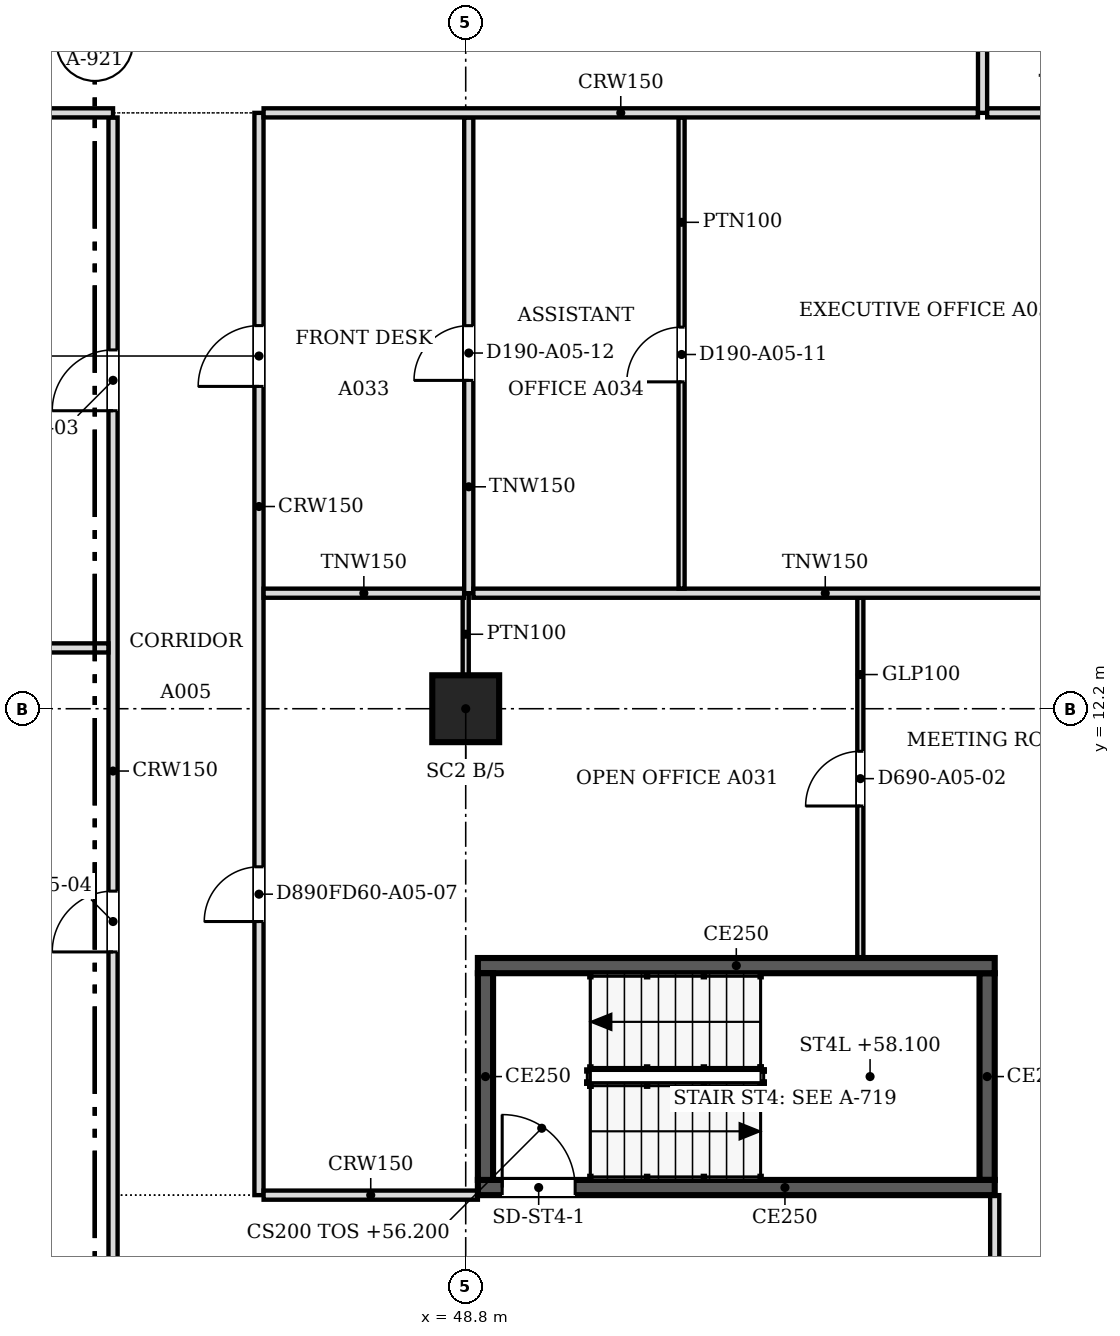
"""IFC4 building model, lengths in metres.
Left out: names, types, materials, properties, quantities, classifications, styles, units other than length and angle.
Written with IfcOpenShell. Run it as: python <this file> out.ifc"""

import sys

from ifc_helpers import new_model, si_unit, direction, frame, frame_2d, origin, origin_2d, place, context, subcontext, project, spatial, polyline, rectangle, outline, extrude, faceted_brep, source, transform, mapped, element, fill, save


model = new_model("IFC4")
c1 = context("Model", 3, precision=1e-05, world=origin(), true_north=direction((0.0, 1.0)))
c2 = subcontext(c1, "Body", "Model", "MODEL_VIEW")
j1 = project(units=[si_unit("LENGTHUNIT", "METRE"), si_unit("PLANEANGLEUNIT", "RADIAN")], contexts=[c1])
p1 = place(None, origin())
s1 = spatial("IfcSite", under=j1, at=p1, CompositionType="ELEMENT")
p2 = place(p1, origin())
s2 = spatial("IfcBuilding", under=s1, at=p2, CompositionType="ELEMENT")
p3 = place(p2, frame((0.0, 0.0, 56.2)))
s3 = spatial("IfcBuildingStorey", under=s2, at=p3, CompositionType="ELEMENT", Elevation=56.2)
p4 = place(p3, frame((48.8, 12.2, 0.0), z_axis=(0.0, 0.0, 1.0), x_axis=(1.0, 0.0, 0.0)))
e1 = element("IfcColumn", 1, at=p4, inside=s3, PredefinedType="COLUMN", context=c2, shape_type="SweptSolid", body=[
    extrude(rectangle(XDim=1.1, YDim=1.1, at=origin_2d()), origin(), (0.0, 0.0, 1.0), 3.6),
])
m1 = source(origin(), c2, "Body", "Brep", [
    faceted_brep([(2.944, -0.25, 0.0), (2.997, -0.25, 0.068), (2.997, -0.25, 7.532), (2.944, -0.25, 7.6), (0.0, -0.25, 3.8), (0.053, 0.25, 3.868), (2.891, 0.25, 7.532), (2.891, 0.25, 0.068), (0.053, 0.25, 3.732), (2.944, 0.0, 0.0), (2.944, 0.0, 7.6), (0.0, 0.0, 3.8)], [[[0, 1, 2, 3, 4]], [[5, 6, 7, 8]], [[1, 0, 9]], [[10, 3, 2]], [[6, 5, 11, 4, 3, 10]], [[8, 7, 9, 0, 4, 11]], [[8, 11, 5]], [[1, 9, 7, 6, 10, 2]]]),
])
p5 = place(p3, frame((57.606, 1.312, -3.8), z_axis=(0.0, 0.0, 1.0), x_axis=(0.707147509625, 0.707066050402, 0.0)))
e2 = element("IfcWall", 2, at=p5, inside=s3, PredefinedType="SOLIDWALL", context=c2, shape_type="MappedRepresentation", body=[
    mapped(m1, transform((0.0, 0.0, 0.0), scale=1.0)),
])
m2 = source(origin(), c2, "Body", "SweptSolid", [
    extrude(outline(polyline([(2.744, 6.934), (0.316, 3.8), (2.744, 0.667), (2.744, 6.934)])), frame((0.0, 0.26, 0.0), z_axis=(0.0, -1.0, 0.0), x_axis=(1.0, 0.0, 0.0)), (0.0, 0.0, 1.0), 0.52),
])
p6 = place(p5, origin())
e3 = element("IfcOpeningElement", 3, at=p6, cuts=e2, PredefinedType="OPENING", context=c2, shape_type="MappedRepresentation", body=[
    mapped(m2, transform((0.0, 0.0, 0.0), scale=1.0)),
])
p7 = place(p2, frame((0.0, 0.0, 60.0)))
s4 = spatial("IfcBuildingStorey", under=s2, at=p7, CompositionType="ELEMENT", Elevation=60.0)
m3 = source(origin(), c2, "Body", "Brep", [
    faceted_brep([(0.053, -0.25, 0.0), (2.997, -0.25, 3.8), (0.053, -0.25, 7.6), (0.0, -0.25, 7.532), (0.0, -0.25, 0.068), (0.106, 0.25, 7.532), (2.944, 0.25, 3.868), (2.944, 0.25, 3.732), (0.106, 0.25, 0.068), (2.997, 0.0, 3.8), (0.053, 0.0, 0.0), (0.053, 0.0, 7.6)], [[[0, 1, 2, 3, 4]], [[5, 6, 7, 8]], [[8, 7, 9, 1, 0, 10]], [[6, 5, 11, 2, 1, 9]], [[3, 2, 11]], [[10, 0, 4]], [[8, 10, 4, 3, 11, 5]], [[9, 7, 6]]]),
])
p8 = place(p7, frame((57.569, 1.274, -3.8), z_axis=(0.0, 0.0, 1.0), x_axis=(0.707066050402, 0.707147509625, 0.0)))
e4 = element("IfcWall", 4, at=p8, inside=s4, PredefinedType="SOLIDWALL", context=c2, shape_type="MappedRepresentation", body=[
    mapped(m3, transform((0.0, 0.0, 0.0), scale=1.0)),
])
m4 = source(origin(), c2, "Body", "SweptSolid", [
    extrude(outline(polyline([(0.253, 0.666), (2.681, 3.8), (0.253, 6.934), (0.253, 0.666)])), frame((0.0, 0.26, 0.0), z_axis=(0.0, -1.0, 0.0), x_axis=(1.0, 0.0, 0.0)), (0.0, 0.0, 1.0), 0.52),
])
p9 = place(p8, origin())
e5 = element("IfcOpeningElement", 5, at=p9, cuts=e4, PredefinedType="OPENING", context=c2, shape_type="MappedRepresentation", body=[
    mapped(m4, transform((0.0, 0.0, 0.0), scale=1.0)),
])
p10 = place(p3, frame((57.5, 4.325, 0.0), z_axis=(0.0, 0.0, 1.0), x_axis=(-1.0, 0.0, 0.0)))
e6 = element("IfcWall", 6, at=p10, inside=s3, PredefinedType="SOLIDWALL", context=c2, shape_type="SweptSolid", body=[
    extrude(rectangle(XDim=8.5, YDim=0.25, at=frame_2d((4.25, 0.0))), origin(), (0.0, 0.0, 1.0), 3.8),
])
m5 = source(origin(), c2, "Body", "SweptSolid", [
    extrude(rectangle(XDim=1.2, YDim=2.1, at=frame_2d((0.6, 1.05))), frame((0.0, 0.135, 0.0), z_axis=(0.0, -1.0, 0.0), x_axis=(1.0, 0.0, 0.0)), (0.0, 0.0, 1.0), 0.27),
])
p11 = place(p10, frame((6.9, 0.0, 0.0)))
e7 = element("IfcOpeningElement", 7, at=p11, cuts=e6, PredefinedType="OPENING", context=c2, shape_type="MappedRepresentation", body=[
    mapped(m5, transform((0.0, 0.0, 0.0), scale=1.0)),
])
p12 = place(p3, frame((49.125, 4.45, 0.0), z_axis=(0.0, 0.0, 1.0), x_axis=(0.0, 1.0, 0.0)))
e8 = element("IfcWall", 8, at=p12, inside=s3, PredefinedType="SOLIDWALL", context=c2, shape_type="SweptSolid", body=[
    extrude(rectangle(XDim=3.4, YDim=0.25, at=frame_2d((1.7, 0.0))), origin(), (0.0, 0.0, 1.0), 3.8),
])
p13 = place(p3, frame((49.0, 7.975, 0.0), z_axis=(0.0, 0.0, 1.0), x_axis=(1.0, 0.0, 0.0)))
e9 = element("IfcWall", 9, at=p13, inside=s3, PredefinedType="SOLIDWALL", context=c2, shape_type="SweptSolid", body=[
    extrude(rectangle(XDim=8.5, YDim=0.25, at=frame_2d((4.25, 0.0))), origin(), (0.0, 0.0, 1.0), 3.8),
])
p14 = place(p3, frame((57.375, 7.85, 0.0), z_axis=(0.0, 0.0, 1.0), x_axis=(0.0, -1.0, 0.0)))
e10 = element("IfcWall", 10, at=p14, inside=s3, PredefinedType="SOLIDWALL", context=c2, shape_type="SweptSolid", body=[
    extrude(rectangle(XDim=3.4, YDim=0.25, at=frame_2d((1.7, 0.0))), origin(), (0.0, 0.0, 1.0), 3.8),
])
p15 = place(p3, frame((43.0, 0.5, 0.0), z_axis=(0.0, 0.0, 1.0), x_axis=(0.0, 1.0, 0.0)))
e11 = element("IfcWall", 11, at=p15, inside=s3, PredefinedType="PARTITIONING", context=c2, shape_type="SweptSolid", body=[
    extrude(rectangle(XDim=21.424, YDim=0.15, at=frame_2d((10.712, 0.0))), origin(), (0.0, 0.0, 1.0), 3.067),
])
m6 = source(origin(), c2, "Body", "SweptSolid", [
    extrude(rectangle(XDim=1.0, YDim=2.1, at=frame_2d((0.5, 1.05))), frame((0.0, 0.085, 0.0), z_axis=(0.0, -1.0, 0.0), x_axis=(1.0, 0.0, 0.0)), (0.0, 0.0, 1.0), 0.17),
])
p16 = place(p15, frame((16.601, 0.0, 0.0)))
e12 = element("IfcOpeningElement", 12, at=p16, cuts=e11, PredefinedType="OPENING", context=c2, shape_type="MappedRepresentation", body=[
    mapped(m6, transform((0.0, 0.0, 0.0), scale=1.0)),
])
p17 = place(p15, frame((7.7, 0.0, 0.0)))
e13 = element("IfcOpeningElement", 13, at=p17, cuts=e11, PredefinedType="OPENING", context=c2, shape_type="MappedRepresentation", body=[
    mapped(m6, transform((0.0, 0.0, 0.0), scale=1.0)),
])
p18 = place(p3, frame((57.5, 1.559, 0.0), z_axis=(0.0, 0.0, 1.0), x_axis=(0.0, 1.0, 0.0)))
e14 = element("IfcWall", 14, at=p18, inside=s3, PredefinedType="PARTITIONING", context=c2, shape_type="SweptSolid", body=[
    extrude(rectangle(XDim=2.641, YDim=0.15, at=frame_2d((1.32, 0.0))), origin(), (0.0, 0.0, 1.0), 3.067),
])
p19 = place(p3, frame((45.4, 22.0, 0.0), z_axis=(0.0, 0.0, 1.0), x_axis=(0.0, -1.0, 0.0)))
e15 = element("IfcWall", 15, at=p19, inside=s3, PredefinedType="PARTITIONING", context=c2, shape_type="SweptSolid", body=[
    extrude(rectangle(XDim=17.8, YDim=0.15, at=frame_2d((8.9, 0.0))), origin(), (0.0, 0.0, 1.0), 3.067),
])
p20 = place(p19, frame((3.499, 0.0, 0.0)))
e16 = element("IfcOpeningElement", 16, at=p20, cuts=e15, PredefinedType="OPENING", context=c2, shape_type="MappedRepresentation", body=[
    mapped(m6, transform((0.0, 0.0, 0.0), scale=1.0)),
])
m7 = source(origin(), c2, "Body", "SweptSolid", [
    extrude(rectangle(XDim=0.9, YDim=2.1, at=frame_2d((0.45, 1.05))), frame((0.0, 0.085, 0.0), z_axis=(0.0, -1.0, 0.0), x_axis=(1.0, 0.0, 0.0)), (0.0, 0.0, 1.0), 0.17),
])
p21 = place(p19, frame((12.4, 0.0, 0.0)))
e17 = element("IfcOpeningElement", 17, at=p21, cuts=e15, PredefinedType="OPENING", context=c2, shape_type="MappedRepresentation", body=[
    mapped(m7, transform((0.0, 0.0, 0.0), scale=1.0)),
])
p22 = place(p3, frame((45.476, 4.2, 0.0), z_axis=(0.0, 0.0, 1.0), x_axis=(1.0, 0.0, 0.0)))
e18 = element("IfcWall", 18, at=p22, inside=s3, PredefinedType="PARTITIONING", context=c2, shape_type="SweptSolid", body=[
    extrude(rectangle(XDim=3.524, YDim=0.15, at=frame_2d((1.762, 0.0))), origin(), (0.0, 0.0, 1.0), 3.067),
])
p23 = place(p3, frame((55.29, 14.024, 0.0), z_axis=(0.0, 0.0, 1.0), x_axis=(0.0, -1.0, 0.0)))
e19 = element("IfcWall", 19, at=p23, inside=s3, PredefinedType="PARTITIONING", context=c2, shape_type="SweptSolid", body=[
    extrude(rectangle(XDim=5.924, YDim=0.1, at=frame_2d((2.962, 0.0))), origin(), (0.0, 0.0, 1.0), 3.067),
])
m8 = source(origin(), c2, "Body", "SweptSolid", [
    extrude(rectangle(XDim=0.9, YDim=2.1, at=frame_2d((0.45, 1.05))), frame((0.0, 0.06, 0.0), z_axis=(0.0, -1.0, 0.0), x_axis=(1.0, 0.0, 0.0)), (0.0, 0.0, 1.0), 0.12),
])
p24 = place(p23, frame((2.524, 0.0, 0.0)))
e20 = element("IfcOpeningElement", 20, at=p24, cuts=e19, PredefinedType="OPENING", context=c2, shape_type="MappedRepresentation", body=[
    mapped(m8, transform((0.0, 0.0, 0.0), scale=1.0)),
])
p25 = place(p3, frame((48.8, 12.75, 0.0), z_axis=(0.0, 0.0, 1.0), x_axis=(0.0, 1.0, 0.0)))
e21 = element("IfcWall", 21, at=p25, inside=s3, PredefinedType="PARTITIONING", context=c2, shape_type="SweptSolid", body=[
    extrude(rectangle(XDim=1.35, YDim=0.1, at=frame_2d((0.675, 0.0))), origin(), (0.0, 0.0, 1.0), 3.067),
])
p26 = place(p3, frame((24.55, 13.2, 0.0), z_axis=(0.0, 0.0, 1.0), x_axis=(1.0, 0.0, 0.0)))
e22 = element("IfcWall", 22, at=p26, inside=s3, PredefinedType="PARTITIONING", context=c2, shape_type="SweptSolid", body=[
    extrude(rectangle(XDim=18.374, YDim=0.15, at=frame_2d((9.187, 0.0))), origin(), (0.0, 0.0, 1.0), 3.067),
])
p27 = place(p3, frame((45.476, 14.1, 0.0), z_axis=(0.0, 0.0, 1.0), x_axis=(1.0, 0.0, 0.0)))
e23 = element("IfcWall", 23, at=p27, inside=s3, PredefinedType="PARTITIONING", context=c2, shape_type="SweptSolid", body=[
    extrude(rectangle(XDim=3.298, YDim=0.15, at=frame_2d((1.649, 0.0))), origin(), (0.0, 0.0, 1.0), 3.067),
])
p28 = place(p3, frame((48.85, 21.924, 0.0), z_axis=(0.0, 0.0, 1.0), x_axis=(0.0, -1.0, 0.0)))
e24 = element("IfcWall", 24, at=p28, inside=s3, PredefinedType="PARTITIONING", context=c2, shape_type="SweptSolid", body=[
    extrude(rectangle(XDim=7.824, YDim=0.15, at=frame_2d((3.912, 0.0))), origin(), (0.0, 0.0, 1.0), 3.067),
])
p29 = place(p28, frame((3.424, 0.0, 0.0)))
e25 = element("IfcOpeningElement", 25, at=p29, cuts=e24, PredefinedType="OPENING", context=c2, shape_type="MappedRepresentation", body=[
    mapped(m7, transform((0.0, 0.0, 0.0), scale=1.0)),
])
p30 = place(p3, frame((48.926, 14.1, 0.0), z_axis=(0.0, 0.0, 1.0), x_axis=(1.0, 0.0, 0.0)))
e26 = element("IfcWall", 26, at=p30, inside=s3, PredefinedType="PARTITIONING", context=c2, shape_type="SweptSolid", body=[
    extrude(rectangle(XDim=11.574, YDim=0.15, at=frame_2d((5.787, 0.0))), origin(), (0.0, 0.0, 1.0), 3.067),
])
p31 = place(p3, frame((52.35, 21.924, 0.0), z_axis=(0.0, 0.0, 1.0), x_axis=(0.0, -1.0, 0.0)))
e27 = element("IfcWall", 27, at=p31, inside=s3, PredefinedType="PARTITIONING", context=c2, shape_type="SweptSolid", body=[
    extrude(rectangle(XDim=7.748, YDim=0.1, at=frame_2d((3.874, 0.0))), origin(), (0.0, 0.0, 1.0), 3.067),
])
p32 = place(p31, frame((3.448, 0.0, 0.0)))
e28 = element("IfcOpeningElement", 28, at=p32, cuts=e27, PredefinedType="OPENING", context=c2, shape_type="MappedRepresentation", body=[
    mapped(m8, transform((0.0, 0.0, 0.0), scale=1.0)),
])
p33 = place(p3, frame((30.5, 22.0, 0.0), z_axis=(0.0, 0.0, 1.0), x_axis=(1.0, 0.0, 0.0)))
e29 = element("IfcWall", 29, at=p33, inside=s3, PredefinedType="PARTITIONING", context=c2, shape_type="SweptSolid", body=[
    extrude(rectangle(XDim=12.5, YDim=0.15, at=frame_2d((6.25, 0.0))), origin(), (0.0, 0.0, 1.0), 3.067),
])
p34 = place(p3, frame((45.476, 22.0, 0.0), z_axis=(0.0, 0.0, 1.0), x_axis=(1.0, 0.0, 0.0)))
e30 = element("IfcWall", 30, at=p34, inside=s3, PredefinedType="PARTITIONING", context=c2, shape_type="SweptSolid", body=[
    extrude(rectangle(XDim=11.748, YDim=0.15, at=frame_2d((5.874, 0.0))), origin(), (0.0, 0.0, 1.0), 3.067),
])
p35 = place(p3, frame((57.3, 30.6, 0.0), z_axis=(0.0, 0.0, 1.0), x_axis=(0.0, -1.0, 0.0)))
e31 = element("IfcWall", 31, at=p35, inside=s3, PredefinedType="PARTITIONING", context=c2, shape_type="SweptSolid", body=[
    extrude(rectangle(XDim=8.6, YDim=0.15, at=frame_2d((4.3, 0.0))), origin(), (0.0, 0.0, 1.0), 3.067),
])
p36 = place(p35, frame((3.9, 0.0, 0.0)))
e32 = element("IfcOpeningElement", 32, at=p36, cuts=e31, PredefinedType="OPENING", context=c2, shape_type="MappedRepresentation", body=[
    mapped(m7, transform((0.0, 0.0, 0.0), scale=1.0)),
])
p37 = place(p3, frame((57.376, 22.0, 0.0), z_axis=(0.0, 0.0, 1.0), x_axis=(1.0, 0.0, 0.0)))
e33 = element("IfcWall", 33, at=p37, inside=s3, PredefinedType="PARTITIONING", context=c2, shape_type="SweptSolid", body=[
    extrude(rectangle(XDim=3.124, YDim=0.15, at=frame_2d((1.562, 0.0))), origin(), (0.0, 0.0, 1.0), 3.067),
])
m9 = source(origin(), c2, "Body", "SweptSolid", [
    extrude(rectangle(XDim=1.2, YDim=2.1, at=frame_2d((0.6, 1.05))), frame((0.0, 0.025, 0.0), z_axis=(0.0, -1.0, 0.0), x_axis=(1.0, 0.0, 0.0)), (0.0, 0.0, 1.0), 0.05),
])
p38 = place(p11, origin())
e34 = element("IfcDoor", 34, at=p38, inside=s3, OperationType="SINGLE_SWING_RIGHT", PredefinedType="DOOR", context=c2, shape_type="MappedRepresentation", body=[
    mapped(m9, transform((0.0, 0.0, 0.0), scale=1.0)),
])
fill(e7, e34)
m10 = source(origin(), c2, "Body", "SweptSolid", [
    extrude(rectangle(XDim=0.9, YDim=2.1, at=frame_2d((0.45, 1.05))), frame((0.0, 0.025, 0.0), z_axis=(0.0, -1.0, 0.0), x_axis=(1.0, 0.0, 0.0)), (0.0, 0.0, 1.0), 0.05),
])
p39 = place(p24, origin())
e35 = element("IfcDoor", 35, at=p39, inside=s3, OperationType="SINGLE_SWING_RIGHT", PredefinedType="DOOR", context=c2, shape_type="MappedRepresentation", body=[
    mapped(m10, transform((0.0, 0.0, 0.0), scale=1.0)),
])
fill(e20, e35)
p40 = place(p32, origin())
e36 = element("IfcDoor", 36, at=p40, inside=s3, OperationType="SINGLE_SWING_RIGHT", PredefinedType="DOOR", context=c2, shape_type="MappedRepresentation", body=[
    mapped(m10, transform((0.0, 0.0, 0.0), scale=1.0)),
])
fill(e28, e36)
p41 = place(p29, origin())
e37 = element("IfcDoor", 37, at=p41, inside=s3, OperationType="SINGLE_SWING_RIGHT", PredefinedType="DOOR", context=c2, shape_type="MappedRepresentation", body=[
    mapped(m10, transform((0.0, 0.0, 0.0), scale=1.0)),
])
fill(e25, e37)
m11 = source(origin(), c2, "Body", "SweptSolid", [
    extrude(rectangle(XDim=1.0, YDim=2.1, at=frame_2d((0.5, 1.05))), frame((0.0, 0.025, 0.0), z_axis=(0.0, -1.0, 0.0), x_axis=(1.0, 0.0, 0.0)), (0.0, 0.0, 1.0), 0.05),
])
p42 = place(p20, origin())
e38 = element("IfcDoor", 38, at=p42, inside=s3, OperationType="SINGLE_SWING_RIGHT", PredefinedType="DOOR", context=c2, shape_type="MappedRepresentation", body=[
    mapped(m11, transform((0.0, 0.0, 0.0), scale=1.0)),
])
fill(e16, e38)
p43 = place(p16, origin())
e39 = element("IfcDoor", 39, at=p43, inside=s3, OperationType="SINGLE_SWING_LEFT", PredefinedType="DOOR", context=c2, shape_type="MappedRepresentation", body=[
    mapped(m11, transform((0.0, 0.0, 0.0), scale=1.0)),
])
fill(e12, e39)
p44 = place(p17, origin())
e40 = element("IfcDoor", 40, at=p44, inside=s3, OperationType="SINGLE_SWING_LEFT", PredefinedType="DOOR", context=c2, shape_type="MappedRepresentation", body=[
    mapped(m11, transform((0.0, 0.0, 0.0), scale=1.0)),
])
fill(e13, e40)
p45 = place(p21, origin())
e41 = element("IfcDoor", 41, at=p45, inside=s3, OperationType="SINGLE_SWING_RIGHT", PredefinedType="DOOR", context=c2, shape_type="MappedRepresentation", body=[
    mapped(m10, transform((0.0, 0.0, 0.0), scale=1.0)),
])
fill(e17, e41)
save(model, sys.argv[1])
